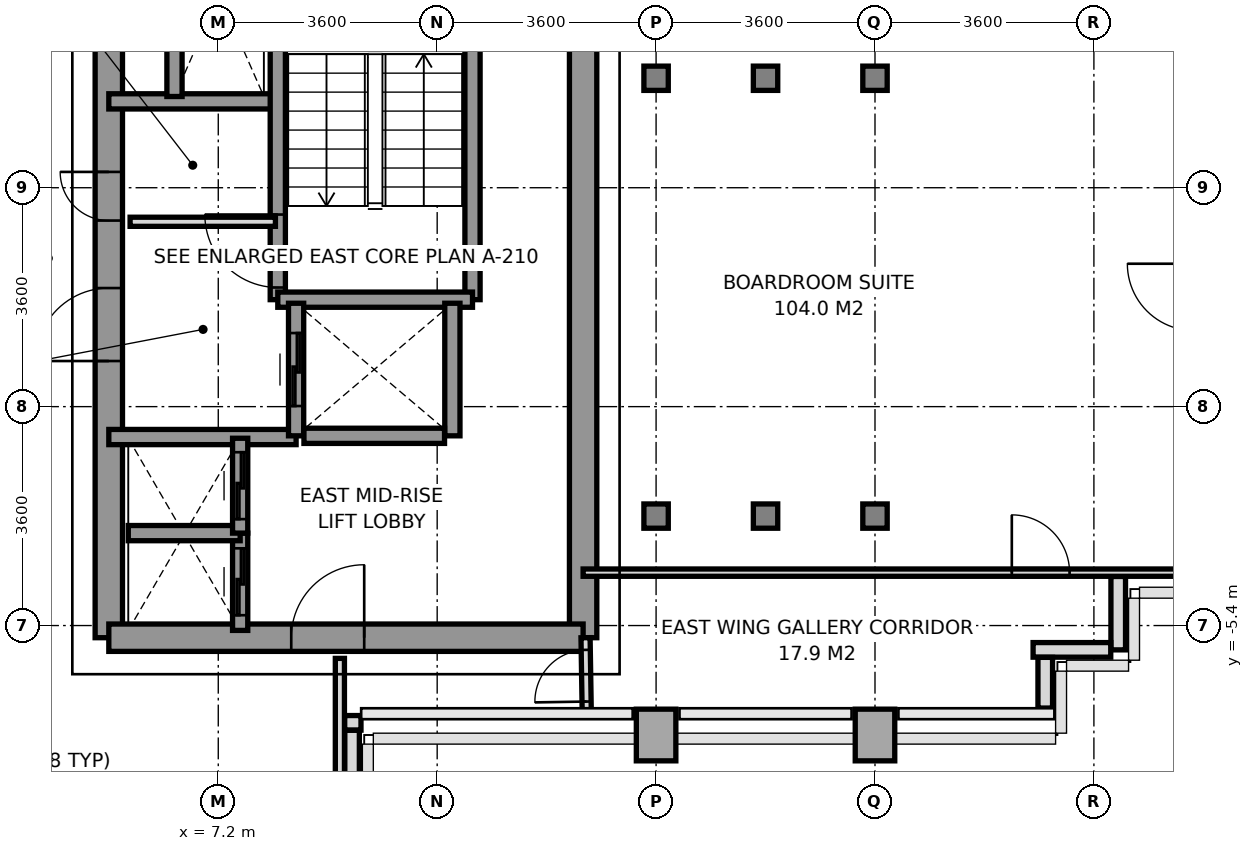
"""IFC4 building model, lengths in metres.
Left out: names, types, materials, properties, quantities, classifications, styles, units other than length and angle.
Written with IfcOpenShell. Run it as: python <this file> out.ifc"""

import sys

from ifc_helpers import new_model, si_unit, direction, frame, frame_2d, origin, origin_2d, place, context, subcontext, project, spatial, rectangle, i_section, extrude, source, transform, mapped, element, fill, save


model = new_model("IFC4")
c1 = context("Model", 3, precision=1e-05, world=origin(), true_north=direction((0.0, 1.0)))
c2 = subcontext(c1, "Body", "Model", "MODEL_VIEW")
j1 = project(units=[si_unit("LENGTHUNIT", "METRE"), si_unit("PLANEANGLEUNIT", "RADIAN")], contexts=[c1])
p1 = place(None, origin())
s1 = spatial("IfcSite", under=j1, at=p1, CompositionType="ELEMENT")
p2 = place(p1, origin())
s2 = spatial("IfcBuilding", under=s1, at=p2, CompositionType="ELEMENT")
p3 = place(p2, frame((0.0, 0.0, 100.6)))
s3 = spatial("IfcBuildingStorey", under=s2, at=p3, CompositionType="ELEMENT", Elevation=100.6)
m1 = source(origin(), c2, "Body", "SweptSolid", [
    extrude(rectangle(XDim=0.65, YDim=0.85, at=origin_2d()), origin(), (0.0, 0.0, 1.0), 3.2),
])
p4 = place(p3, frame((14.4, -7.2, 0.0), z_axis=(0.0, 0.0, 1.0), x_axis=(1.0, 0.0, 0.0)))
e1 = element("IfcColumn", 1, at=p4, inside=s3, PredefinedType="COLUMN", context=c2, shape_type="MappedRepresentation", body=[
    mapped(m1, transform((0.0, 0.0, 0.0), x_axis=(1.0, 0.0, 0.0), y_axis=(0.0, 1.0, 0.0), z_axis=(0.0, 0.0, 1.0), scale=1.0)),
])
m2 = source(origin(), c2, "Body", "SweptSolid", [
    extrude(i_section(OverallWidth=0.401, OverallDepth=0.399, WebThickness=0.02, FlangeThickness=0.032, at=origin_2d()), origin(), (0.0, 0.0, 1.0), 3.2),
])
for number, where, z_axis, x_axis in (
    (2, (14.4, -3.6, 0.0), (0.0, 0.0, 1.0), (1.0, 0.0, 0.0)),
    (3, (14.4, 3.6, 0.0), (0.0, 0.0, 1.0), (1.0, 0.0, 0.0)),
    (4, (16.2, -3.6, 0.0), (0.0, 0.0, 1.0), (1.0, 0.0, 0.0)),
    (5, (16.2, 3.6, 0.0), (0.0, 0.0, 1.0), (1.0, 0.0, 0.0)),
):
    element("IfcColumn", number, at=place(p3, frame(where, z_axis=z_axis, x_axis=x_axis)), inside=s3, PredefinedType="COLUMN", context=c2, shape_type="MappedRepresentation", body=[
        mapped(m2, transform((0.0, 0.0, 0.0), x_axis=(1.0, 0.0, 0.0), y_axis=(0.0, 1.0, 0.0), z_axis=(0.0, 0.0, 1.0), scale=1.0)),
    ])
p5 = place(p3, frame((18.0, -7.2, 0.0), z_axis=(0.0, 0.0, 1.0), x_axis=(1.0, 0.0, 0.0)))
e6 = element("IfcColumn", 6, at=p5, inside=s3, PredefinedType="COLUMN", context=c2, shape_type="MappedRepresentation", body=[
    mapped(m1, transform((0.0, 0.0, 0.0), x_axis=(1.0, 0.0, 0.0), y_axis=(0.0, 1.0, 0.0), z_axis=(0.0, 0.0, 1.0), scale=1.0)),
])
for number, where, z_axis, x_axis in (
    (7, (18.0, -3.6, 0.0), (0.0, 0.0, 1.0), (1.0, 0.0, 0.0)),
    (8, (18.0, 3.6, 0.0), (0.0, 0.0, 1.0), (1.0, 0.0, 0.0)),
):
    element("IfcColumn", number, at=place(p3, frame(where, z_axis=z_axis, x_axis=x_axis)), inside=s3, PredefinedType="COLUMN", context=c2, shape_type="MappedRepresentation", body=[
        mapped(m2, transform((0.0, 0.0, 0.0), x_axis=(1.0, 0.0, 0.0), y_axis=(0.0, 1.0, 0.0), z_axis=(0.0, 0.0, 1.0), scale=1.0)),
    ])
p6 = place(p3, frame((22.0, -4.593, 0.0), z_axis=(0.0, 0.0, 1.0), x_axis=(0.0, -1.0, 0.0)))
e9 = element("IfcWall", 9, at=p6, inside=s3, PredefinedType="PARAPET", context=c2, shape_type="SweptSolid", body=[
    extrude(rectangle(XDim=1.207, YDim=0.24, at=frame_2d((0.604, 0.0))), origin(), (0.0, 0.0, 1.0), 1.15),
])
p7 = place(p3, frame((21.877, -5.8, 0.0), z_axis=(0.0, 0.0, 1.0), x_axis=(-1.0, 0.0, 0.0)))
e10 = element("IfcWall", 10, at=p7, inside=s3, PredefinedType="PARAPET", context=c2, shape_type="SweptSolid", body=[
    extrude(rectangle(XDim=1.277, YDim=0.24, at=frame_2d((0.638, 0.0))), origin(), (0.0, 0.0, 1.0), 1.15),
])
p8 = place(p3, frame((20.8, -5.923, 0.0), z_axis=(0.0, 0.0, 1.0), x_axis=(0.0, -1.0, 0.0)))
e11 = element("IfcWall", 11, at=p8, inside=s3, PredefinedType="PARAPET", context=c2, shape_type="SweptSolid", body=[
    extrude(rectangle(XDim=0.834, YDim=0.24, at=frame_2d((0.417, 0.0))), origin(), (0.0, 0.0, 1.0), 1.15),
])
p9 = place(p3, frame((9.547, -7.0, 0.0), z_axis=(0.0, 0.0, 1.0), x_axis=(-1.0, 0.0, 0.0)))
e12 = element("IfcWall", 12, at=p9, inside=s3, PredefinedType="PARAPET", context=c2, shape_type="SweptSolid", body=[
    extrude(rectangle(XDim=0.269, YDim=0.24, at=frame_2d((0.135, 0.0))), origin(), (0.0, 0.0, 1.0), 1.15),
])
p10 = place(p3, frame((9.4, -7.123, 0.0), z_axis=(0.0, 0.0, 1.0), x_axis=(0.0, -1.0, 0.0)))
e13 = element("IfcWall", 13, at=p10, inside=s3, PredefinedType="PARAPET", context=c2, shape_type="SweptSolid", body=[
    extrude(rectangle(XDim=1.349, YDim=0.24, at=frame_2d((0.674, 0.0))), origin(), (0.0, 0.0, 1.0), 1.15),
])
p11 = place(p3, frame((13.2, -5.6, 0.0), z_axis=(0.0, 0.0, 1.0), x_axis=(0.0, 1.0, 0.0)))
e14 = element("IfcWall", 14, at=p11, inside=s3, PredefinedType="SHEAR", context=c2, shape_type="SweptSolid", body=[
    extrude(rectangle(XDim=11.2, YDim=0.45, at=frame_2d((5.6, 0.0))), origin(), (0.0, 0.0, 1.0), 3.2),
])
p12 = place(p3, frame((5.4, -5.6, 0.0), z_axis=(0.0, 0.0, 1.0), x_axis=(0.0, 1.0, 0.0)))
e15 = element("IfcWall", 15, at=p12, inside=s3, PredefinedType="SHEAR", context=c2, shape_type="SweptSolid", body=[
    extrude(rectangle(XDim=12.5, YDim=0.45, at=frame_2d((6.25, 0.0))), origin(), (0.0, 0.0, 1.0), 3.2),
])
p13 = place(p12, frame((4.55, 0.0, 0.0)))
e16 = element("IfcOpeningElement", 16, at=p13, cuts=e15, PredefinedType="OPENING", context=c2, shape_type="SweptSolid", body=[
    extrude(rectangle(XDim=1.2, YDim=2.2, at=frame_2d((0.6, 1.1))), frame((0.0, 0.235, 0.0), z_axis=(0.0, -1.0, 0.0), x_axis=(1.0, 0.0, 0.0)), (0.0, 0.0, 1.0), 0.47),
])
p14 = place(p12, frame((6.86, 0.0, 0.0)))
e17 = element("IfcOpeningElement", 17, at=p14, cuts=e15, PredefinedType="OPENING", context=c2, shape_type="SweptSolid", body=[
    extrude(rectangle(XDim=0.8, YDim=2.1, at=frame_2d((0.4, 1.05))), frame((0.0, 0.235, 0.0), z_axis=(0.0, -1.0, 0.0), x_axis=(1.0, 0.0, 0.0)), (0.0, 0.0, 1.0), 0.47),
])
p15 = place(p3, frame((5.4, -5.6, 0.0), z_axis=(0.0, 0.0, 1.0), x_axis=(1.0, 0.0, 0.0)))
e18 = element("IfcWall", 18, at=p15, inside=s3, PredefinedType="SHEAR", context=c2, shape_type="SweptSolid", body=[
    extrude(rectangle(XDim=7.8, YDim=0.45, at=frame_2d((3.9, 0.0))), origin(), (0.0, 0.0, 1.0), 3.2),
])
p16 = place(p15, frame((3.0, 0.0, 0.0)))
e19 = element("IfcOpeningElement", 19, at=p16, cuts=e18, PredefinedType="OPENING", context=c2, shape_type="SweptSolid", body=[
    extrude(rectangle(XDim=1.2, YDim=2.2, at=frame_2d((0.6, 1.1))), frame((0.0, 0.235, 0.0), z_axis=(0.0, -1.0, 0.0), x_axis=(1.0, 0.0, 0.0)), (0.0, 0.0, 1.0), 0.47),
])
p17 = place(p3, frame((5.4, 3.22, 0.0), z_axis=(0.0, 0.0, 1.0), x_axis=(1.0, 0.0, 0.0)))
e20 = element("IfcWall", 20, at=p17, inside=s3, PredefinedType="SOLIDWALL", context=c2, shape_type="SweptSolid", body=[
    extrude(rectangle(XDim=2.78, YDim=0.25, at=frame_2d((1.39, 0.0))), origin(), (0.0, 0.0, 1.0), 3.2),
])
p18 = place(p3, frame((5.4, -2.3, 0.0), z_axis=(0.0, 0.0, 1.0), x_axis=(1.0, 0.0, 0.0)))
e21 = element("IfcWall", 21, at=p18, inside=s3, PredefinedType="SOLIDWALL", context=c2, shape_type="SweptSolid", body=[
    extrude(rectangle(XDim=3.08, YDim=0.25, at=frame_2d((1.54, 0.0))), origin(), (0.0, 0.0, 1.0), 3.2),
])
p19 = place(p3, frame((8.179, -0.041, 0.0), z_axis=(0.0, 0.0, 1.0), x_axis=(0.0, 1.0, 0.0)))
e22 = element("IfcWall", 22, at=p19, inside=s3, PredefinedType="SOLIDWALL", context=c2, shape_type="SweptSolid", body=[
    extrude(rectangle(XDim=6.941, YDim=0.25, at=frame_2d((3.47, 0.0))), origin(), (0.0, 0.0, 1.0), 3.2),
])
p20 = place(p19, frame((0.2, 0.0, 0.0)))
e23 = element("IfcOpeningElement", 23, at=p20, cuts=e22, PredefinedType="OPENING", context=c2, shape_type="SweptSolid", body=[
    extrude(rectangle(XDim=1.2, YDim=2.2, at=frame_2d((0.6, 1.1))), frame((0.0, 0.135, 0.0), z_axis=(0.0, -1.0, 0.0), x_axis=(1.0, 0.0, 0.0)), (0.0, 0.0, 1.0), 0.27),
])
p21 = place(p3, frame((11.381, -0.041, 0.0), z_axis=(0.0, 0.0, 1.0), x_axis=(0.0, 1.0, 0.0)))
e24 = element("IfcWall", 24, at=p21, inside=s3, PredefinedType="SOLIDWALL", context=c2, shape_type="SweptSolid", body=[
    extrude(rectangle(XDim=6.941, YDim=0.25, at=frame_2d((3.47, 0.0))), origin(), (0.0, 0.0, 1.0), 3.2),
])
p22 = place(p3, frame((8.179, -0.041, 0.0), z_axis=(0.0, 0.0, 1.0), x_axis=(1.0, 0.0, 0.0)))
e25 = element("IfcWall", 25, at=p22, inside=s3, PredefinedType="SOLIDWALL", context=c2, shape_type="SweptSolid", body=[
    extrude(rectangle(XDim=3.202, YDim=0.25, at=frame_2d((1.601, 0.0))), origin(), (0.0, 0.0, 1.0), 3.2),
])
p23 = place(p3, frame((8.48, -2.28, 0.0), z_axis=(0.0, 0.0, 1.0), x_axis=(0.0, 1.0, 0.0)))
e26 = element("IfcWall", 26, at=p23, inside=s3, PredefinedType="SOLIDWALL", context=c2, shape_type="SweptSolid", body=[
    extrude(rectangle(XDim=2.18, YDim=0.25, at=frame_2d((1.09, 0.0))), origin(), (0.0, 0.0, 1.0), 3.2),
])
p24 = place(p23, frame((0.49, 0.0, 0.0)))
e27 = element("IfcOpeningElement", 27, at=p24, cuts=e26, PredefinedType="OPENING", context=c2, shape_type="SweptSolid", body=[
    extrude(rectangle(XDim=1.2, YDim=2.2, at=frame_2d((0.6, 1.1))), frame((0.0, 0.135, 0.0), z_axis=(0.0, -1.0, 0.0), x_axis=(1.0, 0.0, 0.0)), (0.0, 0.0, 1.0), 0.27),
])
p25 = place(p3, frame((11.05, -2.28, 0.0), z_axis=(0.0, 0.0, 1.0), x_axis=(0.0, 1.0, 0.0)))
e28 = element("IfcWall", 28, at=p25, inside=s3, PredefinedType="SOLIDWALL", context=c2, shape_type="SweptSolid", body=[
    extrude(rectangle(XDim=2.18, YDim=0.25, at=frame_2d((1.09, 0.0))), origin(), (0.0, 0.0, 1.0), 3.2),
])
p26 = place(p3, frame((8.609, -2.28, 0.0), z_axis=(0.0, 0.0, 1.0), x_axis=(1.0, 0.0, 0.0)))
e29 = element("IfcWall", 29, at=p26, inside=s3, PredefinedType="SOLIDWALL", context=c2, shape_type="SweptSolid", body=[
    extrude(rectangle(XDim=2.312, YDim=0.25, at=frame_2d((1.156, 0.0))), origin(), (0.0, 0.0, 1.0), 3.2),
])
p27 = place(p3, frame((7.56, -5.48, 0.0), z_axis=(0.0, 0.0, 1.0), x_axis=(0.0, 1.0, 0.0)))
e30 = element("IfcWall", 30, at=p27, inside=s3, PredefinedType="SOLIDWALL", context=c2, shape_type="SweptSolid", body=[
    extrude(rectangle(XDim=1.6, YDim=0.25, at=frame_2d((0.8, 0.0))), origin(), (0.0, 0.0, 1.0), 3.2),
])
p28 = place(p27, frame((0.25, 0.0, 0.0)))
e31 = element("IfcOpeningElement", 31, at=p28, cuts=e30, PredefinedType="OPENING", context=c2, shape_type="SweptSolid", body=[
    extrude(rectangle(XDim=1.1, YDim=2.2, at=frame_2d((0.55, 1.1))), frame((0.0, 0.135, 0.0), z_axis=(0.0, -1.0, 0.0), x_axis=(1.0, 0.0, 0.0)), (0.0, 0.0, 1.0), 0.27),
])
p29 = place(p3, frame((5.72, -3.88, 0.0), z_axis=(0.0, 0.0, 1.0), x_axis=(1.0, 0.0, 0.0)))
e32 = element("IfcWall", 32, at=p29, inside=s3, PredefinedType="SOLIDWALL", context=c2, shape_type="SweptSolid", body=[
    extrude(rectangle(XDim=1.84, YDim=0.25, at=frame_2d((0.92, 0.0))), origin(), (0.0, 0.0, 1.0), 3.2),
])
p30 = place(p3, frame((7.56, -3.88, 0.0), z_axis=(0.0, 0.0, 1.0), x_axis=(0.0, 1.0, 0.0)))
e33 = element("IfcWall", 33, at=p30, inside=s3, PredefinedType="SOLIDWALL", context=c2, shape_type="SweptSolid", body=[
    extrude(rectangle(XDim=1.56, YDim=0.25, at=frame_2d((0.78, 0.0))), origin(), (0.0, 0.0, 1.0), 3.2),
])
p31 = place(p30, frame((0.23, 0.0, 0.0)))
e34 = element("IfcOpeningElement", 34, at=p31, cuts=e33, PredefinedType="OPENING", context=c2, shape_type="SweptSolid", body=[
    extrude(rectangle(XDim=1.1, YDim=2.2, at=frame_2d((0.55, 1.1))), frame((0.0, 0.135, 0.0), z_axis=(0.0, -1.0, 0.0), x_axis=(1.0, 0.0, 0.0)), (0.0, 0.0, 1.0), 0.27),
])
p32 = place(p3, frame((6.48, 3.3, 0.0), z_axis=(0.0, 0.0, 1.0), x_axis=(0.0, 1.0, 0.0)))
e35 = element("IfcWall", 35, at=p32, inside=s3, PredefinedType="SOLIDWALL", context=c2, shape_type="SweptSolid", body=[
    extrude(rectangle(XDim=1.68, YDim=0.25, at=frame_2d((0.84, 0.0))), origin(), (0.0, 0.0, 1.0), 3.2),
])
p33 = place(p3, frame((5.75, 1.24, 0.0), z_axis=(0.0, 0.0, 1.0), x_axis=(1.0, 0.0, 0.0)))
e36 = element("IfcWall", 36, at=p33, inside=s3, PredefinedType="PARTITIONING", context=c2, shape_type="SweptSolid", body=[
    extrude(rectangle(XDim=2.39, YDim=0.15, at=frame_2d((1.195, 0.0))), origin(), (0.0, 0.0, 1.0), 2.3),
])
p34 = place(p3, frame((9.2, -15.68, 0.0), z_axis=(0.0, 0.0, 1.0), x_axis=(0.0, 1.0, 0.0)))
e37 = element("IfcWall", 37, at=p34, inside=s3, PredefinedType="PARTITIONING", context=c2, shape_type="SweptSolid", body=[
    extrude(rectangle(XDim=9.74, YDim=0.15, at=frame_2d((4.87, 0.0))), origin(), (0.0, 0.0, 1.0), 2.7),
])
p35 = place(p3, frame((13.26, -6.85, 0.0), z_axis=(0.0, 0.0, 1.0), x_axis=(-0.016013571389, 0.999871774545, 0.0)))
e38 = element("IfcWall", 38, at=p35, inside=s3, PredefinedType="PARTITIONING", context=c2, shape_type="SweptSolid", body=[
    extrude(rectangle(XDim=1.25, YDim=0.15, at=frame_2d((0.625, 0.0))), origin(), (0.0, 0.0, 1.0), 3.2),
])
p36 = place(p35, frame((0.2, 0.0, 0.0)))
e39 = element("IfcOpeningElement", 39, at=p36, cuts=e38, PredefinedType="OPENING", context=c2, shape_type="SweptSolid", body=[
    extrude(rectangle(XDim=0.85, YDim=2.1, at=frame_2d((0.425, 1.05))), frame((0.0, 0.085, 0.0), z_axis=(0.0, -1.0, 0.0), x_axis=(1.0, 0.0, 0.0)), (0.0, 0.0, 1.0), 0.17),
])
p37 = place(p3, frame((13.2, -4.53, 0.0), z_axis=(0.0, 0.0, 1.0), x_axis=(1.0, 0.0, 0.0)))
e40 = element("IfcWall", 40, at=p37, inside=s3, PredefinedType="PARTITIONING", context=c2, shape_type="SweptSolid", body=[
    extrude(rectangle(XDim=10.1, YDim=0.12, at=frame_2d((5.05, 0.0))), origin(), (0.0, 0.0, 1.0), 2.75),
])
p38 = place(p37, frame((7.05, 0.0, 0.0)))
e41 = element("IfcOpeningElement", 41, at=p38, cuts=e40, PredefinedType="OPENING", context=c2, shape_type="SweptSolid", body=[
    extrude(rectangle(XDim=0.95, YDim=2.15, at=frame_2d((0.475, 1.075))), frame((0.0, 0.07, 0.0), z_axis=(0.0, -1.0, 0.0), x_axis=(1.0, 0.0, 0.0)), (0.0, 0.0, 1.0), 0.14),
])
m3 = source(origin(), c2, "Body", "SweptSolid", [
    extrude(rectangle(XDim=1.2, YDim=2.2, at=frame_2d((0.6, 1.1))), frame((0.0, 0.025, 0.0), z_axis=(0.0, -1.0, 0.0), x_axis=(1.0, 0.0, 0.0)), (0.0, 0.0, 1.0), 0.05),
])
p39 = place(p20, origin())
e42 = element("IfcDoor", 42, at=p39, inside=s3, OperationType="SINGLE_SWING_RIGHT", PredefinedType="DOOR", context=c2, shape_type="MappedRepresentation", body=[
    mapped(m3, transform((0.0, 0.0, 0.0), x_axis=(1.0, 0.0, 0.0), y_axis=(0.0, 1.0, 0.0), z_axis=(0.0, 0.0, 1.0), scale=1.0)),
])
fill(e23, e42)
p40 = place(p13, origin())
e43 = element("IfcDoor", 43, at=p40, inside=s3, OperationType="SINGLE_SWING_LEFT", PredefinedType="DOOR", context=c2, shape_type="MappedRepresentation", body=[
    mapped(m3, transform((0.0, 0.0, 0.0), x_axis=(1.0, 0.0, 0.0), y_axis=(0.0, 1.0, 0.0), z_axis=(0.0, 0.0, 1.0), scale=1.0)),
])
fill(e16, e43)
p41 = place(p16, origin())
e44 = element("IfcDoor", 44, at=p41, inside=s3, OperationType="SINGLE_SWING_RIGHT", PredefinedType="DOOR", context=c2, shape_type="MappedRepresentation", body=[
    mapped(m3, transform((0.0, 0.0, 0.0), x_axis=(1.0, 0.0, 0.0), y_axis=(0.0, 1.0, 0.0), z_axis=(0.0, 0.0, 1.0), scale=1.0)),
])
fill(e19, e44)
m4 = source(origin(), c2, "Body", "SweptSolid", [
    extrude(rectangle(XDim=0.8, YDim=2.1, at=frame_2d((0.4, 1.05))), frame((0.0, 0.025, 0.0), z_axis=(0.0, -1.0, 0.0), x_axis=(1.0, 0.0, 0.0)), (0.0, 0.0, 1.0), 0.05),
])
p42 = place(p14, origin())
e45 = element("IfcDoor", 45, at=p42, inside=s3, OperationType="SINGLE_SWING_RIGHT", PredefinedType="DOOR", context=c2, shape_type="MappedRepresentation", body=[
    mapped(m4, transform((0.0, 0.0, 0.0), x_axis=(1.0, 0.0, 0.0), y_axis=(0.0, 1.0, 0.0), z_axis=(0.0, 0.0, 1.0), scale=1.0)),
])
fill(e17, e45)
p43 = place(p24, origin())
e46 = element("IfcDoor", 46, at=p43, inside=s3, OperationType="SLIDING_TO_RIGHT", PredefinedType="DOOR", context=c2, shape_type="MappedRepresentation", body=[
    mapped(m3, transform((0.0, 0.0, 0.0), x_axis=(1.0, 0.0, 0.0), y_axis=(0.0, 1.0, 0.0), z_axis=(0.0, 0.0, 1.0), scale=1.0)),
])
fill(e27, e46)
m5 = source(origin(), c2, "Body", "SweptSolid", [
    extrude(rectangle(XDim=1.1, YDim=2.2, at=frame_2d((0.55, 1.1))), frame((0.0, 0.025, 0.0), z_axis=(0.0, -1.0, 0.0), x_axis=(1.0, 0.0, 0.0)), (0.0, 0.0, 1.0), 0.05),
])
p44 = place(p28, origin())
e47 = element("IfcDoor", 47, at=p44, inside=s3, OperationType="SLIDING_TO_LEFT", PredefinedType="DOOR", context=c2, shape_type="MappedRepresentation", body=[
    mapped(m5, transform((0.0, 0.0, 0.0), x_axis=(1.0, 0.0, 0.0), y_axis=(0.0, 1.0, 0.0), z_axis=(0.0, 0.0, 1.0), scale=1.0)),
])
fill(e31, e47)
p45 = place(p31, origin())
e48 = element("IfcDoor", 48, at=p45, inside=s3, OperationType="SLIDING_TO_LEFT", PredefinedType="DOOR", context=c2, shape_type="MappedRepresentation", body=[
    mapped(m5, transform((0.0, 0.0, 0.0), x_axis=(1.0, 0.0, 0.0), y_axis=(0.0, 1.0, 0.0), z_axis=(0.0, 0.0, 1.0), scale=1.0)),
])
fill(e34, e48)
m6 = source(origin(), c2, "Body", "SweptSolid", [
    extrude(rectangle(XDim=0.85, YDim=2.1, at=frame_2d((0.425, 1.05))), frame((0.0, 0.025, 0.0), z_axis=(0.0, -1.0, 0.0), x_axis=(1.0, 0.0, 0.0)), (0.0, 0.0, 1.0), 0.05),
])
p46 = place(p36, origin())
e49 = element("IfcDoor", 49, at=p46, inside=s3, OperationType="SINGLE_SWING_LEFT", PredefinedType="DOOR", context=c2, shape_type="MappedRepresentation", body=[
    mapped(m6, transform((0.0, 0.0, 0.0), x_axis=(1.0, 0.0, 0.0), y_axis=(0.0, 1.0, 0.0), z_axis=(0.0, 0.0, 1.0), scale=1.0)),
])
fill(e39, e49)
m7 = source(origin(), c2, "Body", "SweptSolid", [
    extrude(rectangle(XDim=0.95, YDim=2.15, at=frame_2d((0.475, 1.075))), frame((0.0, 0.025, 0.0), z_axis=(0.0, -1.0, 0.0), x_axis=(1.0, 0.0, 0.0)), (0.0, 0.0, 1.0), 0.05),
])
p47 = place(p38, origin())
e50 = element("IfcDoor", 50, at=p47, inside=s3, OperationType="SINGLE_SWING_LEFT", PredefinedType="DOOR", context=c2, shape_type="MappedRepresentation", body=[
    mapped(m7, transform((0.0, 0.0, 0.0), x_axis=(1.0, 0.0, 0.0), y_axis=(0.0, 1.0, 0.0), z_axis=(0.0, 0.0, 1.0), scale=1.0)),
])
fill(e41, e50)
save(model, sys.argv[1])
